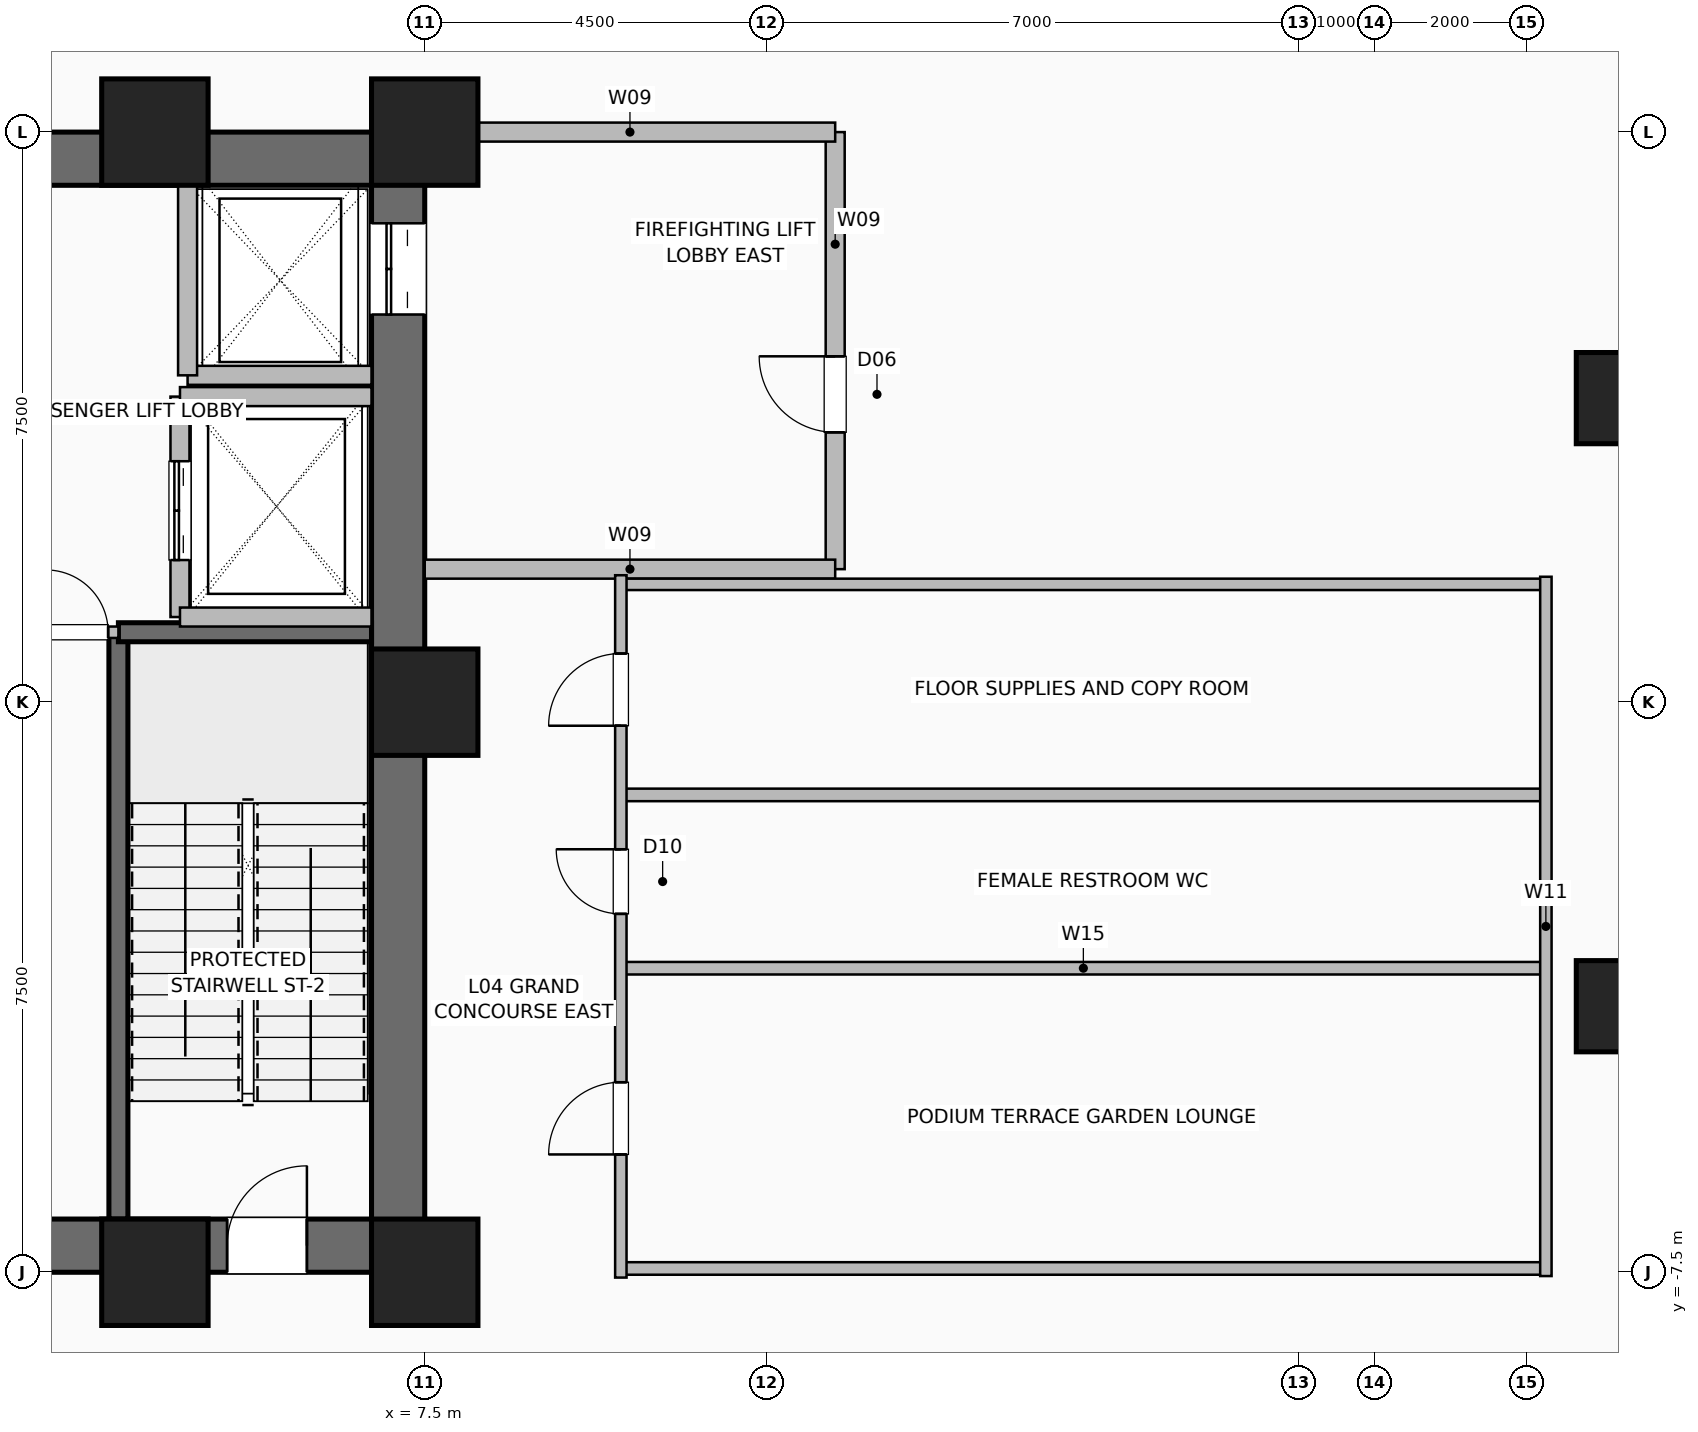
"""IFC4 building model, lengths in metres.
Left out: names, types, materials, properties, quantities, classifications, styles, units other than length and angle.
Written with IfcOpenShell. Run it as: python <this file> out.ifc"""

import sys

from ifc_helpers import new_model, si_unit, direction, frame, frame_2d, origin, origin_2d, place, context, subcontext, project, spatial, rectangle, hollow_rectangle, extrude, element, fill, save


model = new_model("IFC4")
c1 = context("Model", 3, precision=1e-05, world=origin(), true_north=direction((0.0, 1.0)))
c2 = subcontext(c1, "Body", "Model", "MODEL_VIEW")
j1 = project(units=[si_unit("LENGTHUNIT", "METRE"), si_unit("PLANEANGLEUNIT", "RADIAN")], contexts=[c1])
p1 = place(None, origin())
s1 = spatial("IfcSite", under=j1, at=p1, CompositionType="ELEMENT")
p2 = place(p1, origin())
s2 = spatial("IfcBuilding", under=s1, at=p2, CompositionType="ELEMENT")
p3 = place(p2, frame((0.0, 0.0, 21.6)))
s3 = spatial("IfcBuildingStorey", under=s2, at=p3, CompositionType="ELEMENT", Elevation=21.6)
for number, where, z_axis, x_axis in (
    (1, (3.95, -7.5, 0.0), (0.0, 0.0, 1.0), (1.0, 0.0, 0.0)),
    (2, (7.5, -7.5, 0.0), (0.0, 0.0, 1.0), (1.0, 0.0, 0.0)),
    (3, (7.5, 0.0, 0.0), (0.0, 0.0, 1.0), (1.0, 0.0, 0.0)),
    (4, (7.5, 7.5, 0.0), (0.0, 0.0, 1.0), (1.0, 0.0, 0.0)),
    (5, (3.95, 7.5, 0.0), (0.0, 0.0, 1.0), (1.0, 0.0, 0.0)),
):
    element("IfcColumn", number, at=place(p3, frame(where, z_axis=z_axis, x_axis=x_axis)), inside=s3, PredefinedType="COLUMN", context=c2, shape_type="SweptSolid", body=[
        extrude(hollow_rectangle(XDim=1.4, YDim=1.4, WallThickness=0.06, at=origin_2d()), origin(), (0.0, 0.0, 1.0), 5.4),
    ])
for number, where, z_axis, x_axis in (
    (6, (23.25, -4.0, -0.4), (0.0, 0.0, 1.0), (1.0, 0.0, 0.0)),
    (7, (23.25, 4.0, -0.4), (0.0, 0.0, 1.0), (1.0, 0.0, 0.0)),
):
    element("IfcColumn", number, at=place(p3, frame(where, z_axis=z_axis, x_axis=x_axis)), inside=s3, PredefinedType="COLUMN", context=c2, shape_type="SweptSolid", body=[
        extrude(hollow_rectangle(XDim=1.2, YDim=1.2, WallThickness=0.055, at=origin_2d()), origin(), (0.0, 0.0, 1.0), 5.8),
    ])
p4 = place(p3, frame((-7.5, -7.15, 0.0), z_axis=(0.0, 0.0, 1.0), x_axis=(1.0, 0.0, 0.0)))
e8 = element("IfcWall", 8, at=p4, inside=s3, PredefinedType="SHEAR", context=c2, shape_type="SweptSolid", body=[
    extrude(rectangle(XDim=15.0, YDim=0.7, at=frame_2d((7.5, 0.0))), origin(), (0.0, 0.0, 1.0), 5.0),
])
p5 = place(p4, frame((1.55, 0.0, 0.0)))
e9 = element("IfcOpeningElement", 9, at=p5, cuts=e8, PredefinedType="OPENING", context=c2, shape_type="SweptSolid", body=[
    extrude(rectangle(XDim=1.05, YDim=2.08, at=frame_2d((0.525, 1.04))), frame((0.0, 0.36, 0.0), z_axis=(0.0, -1.0, 0.0), x_axis=(1.0, 0.0, 0.0)), (0.0, 0.0, 1.0), 0.72),
])
p6 = place(p4, frame((12.4, 0.0, 0.0)))
e10 = element("IfcOpeningElement", 10, at=p6, cuts=e8, PredefinedType="OPENING", context=c2, shape_type="SweptSolid", body=[
    extrude(rectangle(XDim=1.05, YDim=2.08, at=frame_2d((0.525, 1.04))), frame((0.0, 0.36, 0.0), z_axis=(0.0, -1.0, 0.0), x_axis=(1.0, 0.0, 0.0)), (0.0, 0.0, 1.0), 0.72),
])
p7 = place(p4, frame((4.64, 0.0, 0.0)))
e11 = element("IfcOpeningElement", 11, at=p7, cuts=e8, PredefinedType="OPENING", context=c2, shape_type="SweptSolid", body=[
    extrude(rectangle(XDim=1.1, YDim=2.2, at=frame_2d((0.55, 1.1))), frame((0.0, 0.36, 0.0), z_axis=(0.0, -1.0, 0.0), x_axis=(1.0, 0.0, 0.0)), (0.0, 0.0, 1.0), 0.72),
])
p8 = place(p4, frame((6.52, 0.0, 0.0)))
e12 = element("IfcOpeningElement", 12, at=p8, cuts=e8, PredefinedType="OPENING", context=c2, shape_type="SweptSolid", body=[
    extrude(rectangle(XDim=1.1, YDim=2.2, at=frame_2d((0.55, 1.1))), frame((0.0, 0.36, 0.0), z_axis=(0.0, -1.0, 0.0), x_axis=(1.0, 0.0, 0.0)), (0.0, 0.0, 1.0), 0.72),
])
p9 = place(p4, frame((8.4, 0.0, 0.0)))
e13 = element("IfcOpeningElement", 13, at=p9, cuts=e8, PredefinedType="OPENING", context=c2, shape_type="SweptSolid", body=[
    extrude(rectangle(XDim=1.1, YDim=2.2, at=frame_2d((0.55, 1.1))), frame((0.0, 0.36, 0.0), z_axis=(0.0, -1.0, 0.0), x_axis=(1.0, 0.0, 0.0)), (0.0, 0.0, 1.0), 0.72),
])
p10 = place(p3, frame((-7.5, 7.15, 0.0), z_axis=(0.0, 0.0, 1.0), x_axis=(1.0, 0.0, 0.0)))
e14 = element("IfcWall", 14, at=p10, inside=s3, PredefinedType="SHEAR", context=c2, shape_type="SweptSolid", body=[
    extrude(rectangle(XDim=15.0, YDim=0.7, at=frame_2d((7.5, 0.0))), origin(), (0.0, 0.0, 1.0), 5.0),
])
p11 = place(p3, frame((7.15, -7.5, 0.0), z_axis=(0.0, 0.0, 1.0), x_axis=(0.0, 1.0, 0.0)))
e15 = element("IfcWall", 15, at=p11, inside=s3, PredefinedType="SHEAR", context=c2, shape_type="SweptSolid", body=[
    extrude(rectangle(XDim=15.0, YDim=0.7, at=frame_2d((7.5, 0.0))), origin(), (0.0, 0.0, 1.0), 5.0),
])
p12 = place(p11, frame((12.6, 0.0, 0.0)))
e16 = element("IfcOpeningElement", 16, at=p12, cuts=e15, PredefinedType="OPENING", context=c2, shape_type="SweptSolid", body=[
    extrude(rectangle(XDim=1.2, YDim=2.2, at=frame_2d((0.6, 1.1))), frame((0.0, 0.36, 0.0), z_axis=(0.0, -1.0, 0.0), x_axis=(1.0, 0.0, 0.0)), (0.0, 0.0, 1.0), 0.72),
])
p13 = place(p3, frame((3.47, -6.8, 0.0), z_axis=(0.0, 0.0, 1.0), x_axis=(0.0, 1.0, 0.0)))
e17 = element("IfcWall", 17, at=p13, inside=s3, PredefinedType="SHEAR", context=c2, shape_type="SweptSolid", body=[
    extrude(rectangle(XDim=7.72, YDim=0.25, at=frame_2d((3.86, 0.0))), origin(), (0.0, 0.0, 1.0), 5.0),
])
p14 = place(p3, frame((3.47, 0.92, 0.0), z_axis=(0.0, 0.0, 1.0), x_axis=(1.0, 0.0, 0.0)))
e18 = element("IfcWall", 18, at=p14, inside=s3, PredefinedType="SHEAR", context=c2, shape_type="SweptSolid", body=[
    extrude(rectangle(XDim=3.33, YDim=0.25, at=frame_2d((1.665, 0.0))), origin(), (0.0, 0.0, 1.0), 5.0),
])
p15 = place(p3, frame((4.38, 4.3, 0.0), z_axis=(0.0, 0.0, 1.0), x_axis=(1.0, 0.0, 0.0)))
e19 = element("IfcWall", 19, at=p15, inside=s3, PredefinedType="SHEAR", context=c2, shape_type="SweptSolid", body=[
    extrude(rectangle(XDim=2.42, YDim=0.25, at=frame_2d((1.21, 0.0))), origin(), (0.0, 0.0, 1.0), 5.0),
])
p16 = place(p3, frame((4.38, 4.3, 0.0), z_axis=(0.0, 0.0, 1.0), x_axis=(0.0, 1.0, 0.0)))
e20 = element("IfcWall", 20, at=p16, inside=s3, PredefinedType="SHEAR", context=c2, shape_type="SweptSolid", body=[
    extrude(rectangle(XDim=2.5, YDim=0.25, at=frame_2d((1.25, 0.0))), origin(), (0.0, 0.0, 1.0), 5.0),
])
p17 = place(p3, frame((4.28, 1.12, 0.0), z_axis=(0.0, 0.0, 1.0), x_axis=(0.0, 1.0, 0.0)))
e21 = element("IfcWall", 21, at=p17, inside=s3, PredefinedType="SHEAR", context=c2, shape_type="SweptSolid", body=[
    extrude(rectangle(XDim=2.9, YDim=0.25, at=frame_2d((1.45, 0.0))), origin(), (0.0, 0.0, 1.0), 5.0),
])
p18 = place(p17, frame((0.75, 0.0, 0.0)))
e22 = element("IfcOpeningElement", 22, at=p18, cuts=e21, PredefinedType="OPENING", context=c2, shape_type="SweptSolid", body=[
    extrude(rectangle(XDim=1.3, YDim=2.3, at=frame_2d((0.65, 1.15))), frame((0.0, 0.135, 0.0), z_axis=(0.0, -1.0, 0.0), x_axis=(1.0, 0.0, 0.0)), (0.0, 0.0, 1.0), 0.27),
])
for number, where, z_axis, x_axis in (
    (23, (4.28, 1.12, 0.0), (0.0, 0.0, 1.0), (1.0, 0.0, 0.0)),
    (24, (4.28, 4.02, 0.0), (0.0, 0.0, 1.0), (1.0, 0.0, 0.0)),
):
    element("IfcWall", number, at=place(p3, frame(where, z_axis=z_axis, x_axis=x_axis)), inside=s3, PredefinedType="SHEAR", context=c2, shape_type="SweptSolid", body=[
        extrude(rectangle(XDim=2.52, YDim=0.25, at=frame_2d((1.26, 0.0))), origin(), (0.0, 0.0, 1.0), 5.0),
    ])
p19 = place(p3, frame((2.38, 0.92, 0.0), z_axis=(0.0, 0.0, 1.0), x_axis=(1.0, 0.0, 0.0)))
e25 = element("IfcWall", 25, at=p19, inside=s3, PredefinedType="PARTITIONING", context=c2, shape_type="SweptSolid", body=[
    extrude(rectangle(XDim=1.09, YDim=0.15, at=frame_2d((0.545, 0.0))), origin(), (0.0, 0.0, 1.0), 5.0),
])
p20 = place(p19, frame((0.135, 0.0, 0.0)))
e26 = element("IfcOpeningElement", 26, at=p20, cuts=e25, PredefinedType="OPENING", context=c2, shape_type="SweptSolid", body=[
    extrude(rectangle(XDim=0.82, YDim=2.05, at=frame_2d((0.41, 1.025))), frame((0.0, 0.085, 0.0), z_axis=(0.0, -1.0, 0.0), x_axis=(1.0, 0.0, 0.0)), (0.0, 0.0, 1.0), 0.17),
])
p21 = place(p3, frame((12.9, 1.75, 0.0), z_axis=(0.0, 0.0, 1.0), x_axis=(0.0, 1.0, 0.0)))
e27 = element("IfcWall", 27, at=p21, inside=s3, PredefinedType="SHEAR", context=c2, shape_type="SweptSolid", body=[
    extrude(rectangle(XDim=5.75, YDim=0.25, at=frame_2d((2.875, 0.0))), origin(), (0.0, 0.0, 1.0), 5.0),
])
p22 = place(p21, frame((1.8, 0.0, 0.0)))
e28 = element("IfcOpeningElement", 28, at=p22, cuts=e27, PredefinedType="OPENING", context=c2, shape_type="SweptSolid", body=[
    extrude(rectangle(XDim=1.0, YDim=2.08, at=frame_2d((0.5, 1.04))), frame((0.0, 0.135, 0.0), z_axis=(0.0, -1.0, 0.0), x_axis=(1.0, 0.0, 0.0)), (0.0, 0.0, 1.0), 0.27),
])
p23 = place(p3, frame((7.5, 1.75, 0.0), z_axis=(0.0, 0.0, 1.0), x_axis=(1.0, 0.0, 0.0)))
e29 = element("IfcWall", 29, at=p23, inside=s3, PredefinedType="SHEAR", context=c2, shape_type="SweptSolid", body=[
    extrude(rectangle(XDim=5.4, YDim=0.25, at=frame_2d((2.7, 0.0))), origin(), (0.0, 0.0, 1.0), 5.0),
])
p24 = place(p3, frame((7.5, 7.5, 0.0), z_axis=(0.0, 0.0, 1.0), x_axis=(1.0, 0.0, 0.0)))
e30 = element("IfcWall", 30, at=p24, inside=s3, PredefinedType="SHEAR", context=c2, shape_type="SweptSolid", body=[
    extrude(rectangle(XDim=5.4, YDim=0.25, at=frame_2d((2.7, 0.0))), origin(), (0.0, 0.0, 1.0), 3.375),
])
for number, where, z_axis, x_axis in (
    (31, (10.08, -1.22, 0.0), (0.0, 0.0, 1.0), (1.0, 0.0, 0.0)),
    (32, (10.08, -7.45, 0.0), (0.0, 0.0, 1.0), (1.0, 0.0, 0.0)),
    (33, (10.08, -3.5, 0.0), (0.0, 0.0, 1.0), (1.0, 0.0, 0.0)),
):
    element("IfcWall", number, at=place(p3, frame(where, z_axis=z_axis, x_axis=x_axis)), inside=s3, PredefinedType="PLUMBINGWALL", context=c2, shape_type="SweptSolid", body=[
        extrude(rectangle(XDim=12.17, YDim=0.165, at=frame_2d((6.085, 0.0))), origin(), (0.0, 0.0, 1.0), 5.0),
    ])
p25 = place(p3, frame((10.08, 1.55, 0.0), z_axis=(0.0, 0.0, 1.0), x_axis=(1.0, 0.0, 0.0)))
e34 = element("IfcWall", 34, at=p25, inside=s3, PredefinedType="PARTITIONING", context=c2, shape_type="SweptSolid", body=[
    extrude(rectangle(XDim=12.17, YDim=0.15, at=frame_2d((6.085, 0.0))), origin(), (0.0, 0.0, 1.0), 5.0),
])
p26 = place(p3, frame((10.08, -7.57, 0.0), z_axis=(0.0, 0.0, 1.0), x_axis=(0.0, 1.0, 0.0)))
e35 = element("IfcWall", 35, at=p26, inside=s3, PredefinedType="PARTITIONING", context=c2, shape_type="SweptSolid", body=[
    extrude(rectangle(XDim=9.24, YDim=0.15, at=frame_2d((4.62, 0.0))), origin(), (0.0, 0.0, 1.0), 5.0),
])
p27 = place(p26, frame((1.62, 0.0, 0.0)))
e36 = element("IfcOpeningElement", 36, at=p27, cuts=e35, PredefinedType="OPENING", context=c2, shape_type="SweptSolid", body=[
    extrude(rectangle(XDim=0.95, YDim=2.06, at=frame_2d((0.475, 1.03))), frame((0.0, 0.085, 0.0), z_axis=(0.0, -1.0, 0.0), x_axis=(1.0, 0.0, 0.0)), (0.0, 0.0, 1.0), 0.17),
])
p28 = place(p26, frame((4.785, 0.0, 0.0)))
e37 = element("IfcOpeningElement", 37, at=p28, cuts=e35, PredefinedType="OPENING", context=c2, shape_type="SweptSolid", body=[
    extrude(rectangle(XDim=0.85, YDim=2.05, at=frame_2d((0.425, 1.025))), frame((0.0, 0.085, 0.0), z_axis=(0.0, -1.0, 0.0), x_axis=(1.0, 0.0, 0.0)), (0.0, 0.0, 1.0), 0.17),
])
p29 = place(p26, frame((7.26, 0.0, 0.0)))
e38 = element("IfcOpeningElement", 38, at=p29, cuts=e35, PredefinedType="OPENING", context=c2, shape_type="SweptSolid", body=[
    extrude(rectangle(XDim=0.95, YDim=2.06, at=frame_2d((0.475, 1.03))), frame((0.0, 0.085, 0.0), z_axis=(0.0, -1.0, 0.0), x_axis=(1.0, 0.0, 0.0)), (0.0, 0.0, 1.0), 0.17),
])
p30 = place(p3, frame((22.25, -7.55, 0.0), z_axis=(0.0, 0.0, 1.0), x_axis=(0.0, 1.0, 0.0)))
e39 = element("IfcWall", 39, at=p30, inside=s3, PredefinedType="PARTITIONING", context=c2, shape_type="SweptSolid", body=[
    extrude(rectangle(XDim=9.2, YDim=0.15, at=frame_2d((4.6, 0.0))), origin(), (0.0, 0.0, 1.0), 5.0),
])
p31 = place(p6, origin())
e40 = element("IfcDoor", 40, at=p31, inside=s3, OperationType="SINGLE_SWING_RIGHT", PredefinedType="DOOR", context=c2, shape_type="SweptSolid", body=[
    extrude(rectangle(XDim=1.05, YDim=2.08, at=frame_2d((0.525, 1.04))), frame((0.0, 0.025, 0.0), z_axis=(0.0, -1.0, 0.0), x_axis=(1.0, 0.0, 0.0)), (0.0, 0.0, 1.0), 0.05),
])
fill(e10, e40)
p32 = place(p12, origin())
e41 = element("IfcDoor", 41, at=p32, inside=s3, OperationType="DOUBLE_DOOR_SLIDING", PredefinedType="DOOR", context=c2, shape_type="SweptSolid", body=[
    extrude(rectangle(XDim=1.2, YDim=2.2, at=frame_2d((0.6, 1.1))), frame((0.0, 0.025, 0.0), z_axis=(0.0, -1.0, 0.0), x_axis=(1.0, 0.0, 0.0)), (0.0, 0.0, 1.0), 0.05),
])
fill(e16, e41)
p33 = place(p18, origin())
e42 = element("IfcDoor", 42, at=p33, inside=s3, OperationType="DOUBLE_DOOR_SLIDING", PredefinedType="DOOR", context=c2, shape_type="SweptSolid", body=[
    extrude(rectangle(XDim=1.3, YDim=2.3, at=frame_2d((0.65, 1.15))), frame((0.0, 0.025, 0.0), z_axis=(0.0, -1.0, 0.0), x_axis=(1.0, 0.0, 0.0)), (0.0, 0.0, 1.0), 0.05),
])
fill(e22, e42)
p34 = place(p20, origin())
e43 = element("IfcDoor", 43, at=p34, inside=s3, OperationType="SINGLE_SWING_LEFT", PredefinedType="DOOR", context=c2, shape_type="SweptSolid", body=[
    extrude(rectangle(XDim=0.82, YDim=2.05, at=frame_2d((0.41, 1.025))), frame((0.0, 0.025, 0.0), z_axis=(0.0, -1.0, 0.0), x_axis=(1.0, 0.0, 0.0)), (0.0, 0.0, 1.0), 0.05),
])
fill(e26, e43)
p35 = place(p22, origin())
e44 = element("IfcDoor", 44, at=p35, inside=s3, OperationType="SINGLE_SWING_RIGHT", PredefinedType="DOOR", context=c2, shape_type="SweptSolid", body=[
    extrude(rectangle(XDim=1.0, YDim=2.08, at=frame_2d((0.5, 1.04))), frame((0.0, 0.025, 0.0), z_axis=(0.0, -1.0, 0.0), x_axis=(1.0, 0.0, 0.0)), (0.0, 0.0, 1.0), 0.05),
])
fill(e28, e44)
p36 = place(p27, origin())
e45 = element("IfcDoor", 45, at=p36, inside=s3, OperationType="SINGLE_SWING_LEFT", PredefinedType="DOOR", context=c2, shape_type="SweptSolid", body=[
    extrude(rectangle(XDim=0.95, YDim=2.06, at=frame_2d((0.475, 1.03))), frame((0.0, 0.025, 0.0), z_axis=(0.0, -1.0, 0.0), x_axis=(1.0, 0.0, 0.0)), (0.0, 0.0, 1.0), 0.05),
])
fill(e36, e45)
p37 = place(p28, origin())
e46 = element("IfcDoor", 46, at=p37, inside=s3, OperationType="SINGLE_SWING_RIGHT", PredefinedType="DOOR", context=c2, shape_type="SweptSolid", body=[
    extrude(rectangle(XDim=0.85, YDim=2.05, at=frame_2d((0.425, 1.025))), frame((0.0, 0.025, 0.0), z_axis=(0.0, -1.0, 0.0), x_axis=(1.0, 0.0, 0.0)), (0.0, 0.0, 1.0), 0.05),
])
fill(e37, e46)
p38 = place(p29, origin())
e47 = element("IfcDoor", 47, at=p38, inside=s3, OperationType="SINGLE_SWING_LEFT", PredefinedType="DOOR", context=c2, shape_type="SweptSolid", body=[
    extrude(rectangle(XDim=0.95, YDim=2.06, at=frame_2d((0.475, 1.03))), frame((0.0, 0.025, 0.0), z_axis=(0.0, -1.0, 0.0), x_axis=(1.0, 0.0, 0.0)), (0.0, 0.0, 1.0), 0.05),
])
fill(e38, e47)
save(model, sys.argv[1])
